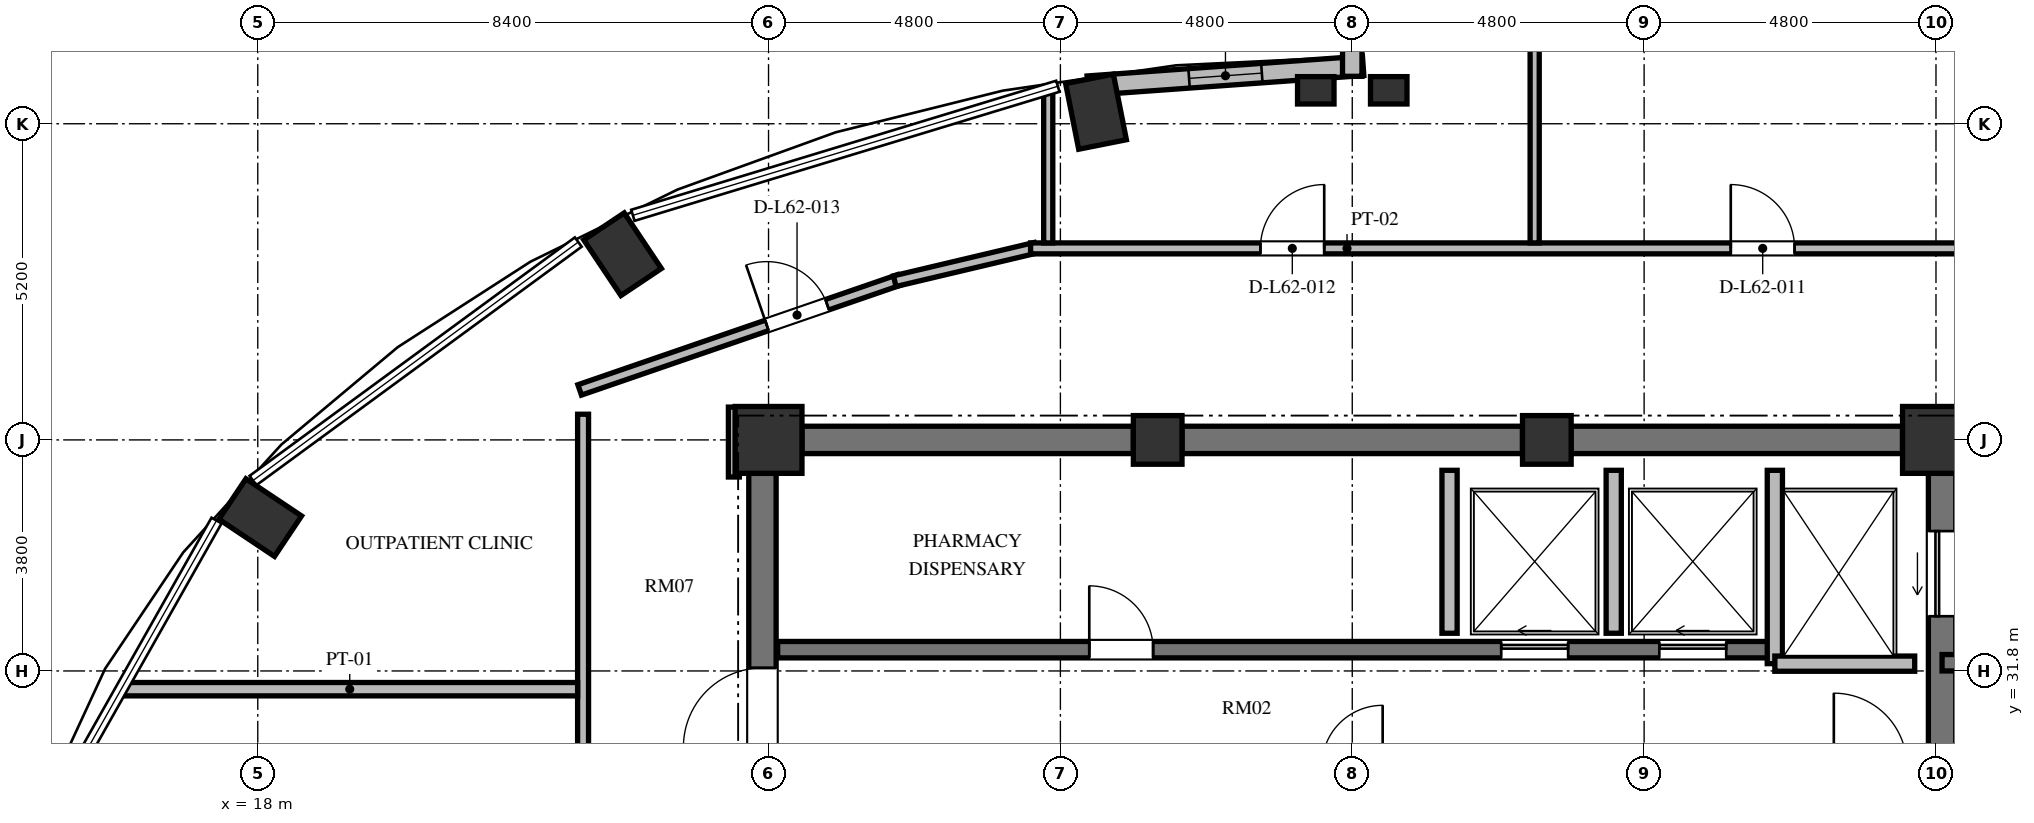
"""IFC4 building model, lengths in metres.
Left out: names, types, materials, properties, quantities, classifications, styles, units other than length and angle.
Written with IfcOpenShell. Run it as: python <this file> out.ifc"""

import sys

from ifc_helpers import new_model, si_unit, direction, frame, frame_2d, origin, origin_2d, place, context, subcontext, project, spatial, rectangle, extrude, element, fill, save


model = new_model("IFC4")
c1 = context("Model", 3, precision=1e-05, world=origin(), true_north=direction((0.0, 1.0)))
c2 = subcontext(c1, "Body", "Model", "MODEL_VIEW")
j1 = project(units=[si_unit("LENGTHUNIT", "METRE"), si_unit("PLANEANGLEUNIT", "RADIAN")], contexts=[c1])
p1 = place(None, origin())
s1 = spatial("IfcSite", under=j1, at=p1, CompositionType="ELEMENT")
p2 = place(p1, origin())
s2 = spatial("IfcBuilding", under=s1, at=p2, CompositionType="ELEMENT")
p3 = place(p2, frame((0.0, 0.0, 238.608)))
s3 = spatial("IfcBuildingStorey", under=s2, at=p3, CompositionType="ELEMENT", Elevation=238.608)
for number, where, z_axis, x_axis in (
    (1, (31.786, 40.998, 0.0), (0.0, 0.0, 1.0), (-0.195, 0.981, 0.0)),
    (2, (24.0, 38.654, 0.0), (0.0, 0.0, 1.0), (-0.556, 0.831, 0.0)),
    (3, (18.04, 34.323, 0.0), (0.0, 0.0, 1.0), (-0.831, 0.556, 0.0)),
):
    element("IfcColumn", number, at=place(p3, frame(where, z_axis=z_axis, x_axis=x_axis)), inside=s3, PredefinedType="COLUMN", context=c2, shape_type="SweptSolid", body=[
        extrude(rectangle(XDim=1.1, YDim=0.8, at=origin_2d()), origin(), (0.0, 0.0, 1.0), 3.648),
    ])
p4 = place(p3, frame((45.6, 35.6, 0.0), z_axis=(0.0, 0.0, 1.0), x_axis=(1.0, 0.0, 0.0)))
e4 = element("IfcColumn", 4, at=p4, inside=s3, PredefinedType="COLUMN", context=c2, shape_type="SweptSolid", body=[
    extrude(rectangle(XDim=1.1, YDim=1.1, at=origin_2d()), origin(), (0.0, 0.0, 1.0), 3.648),
])
for number, where, z_axis, x_axis in (
    (5, (39.2, 35.6, 0.0), (0.0, 0.0, 1.0), (1.0, 0.0, 0.0)),
    (6, (32.8, 35.6, 0.0), (0.0, 0.0, 1.0), (1.0, 0.0, 0.0)),
):
    element("IfcColumn", number, at=place(p3, frame(where, z_axis=z_axis, x_axis=x_axis)), inside=s3, PredefinedType="COLUMN", context=c2, shape_type="SweptSolid", body=[
        extrude(rectangle(XDim=0.8, YDim=0.8, at=origin_2d()), origin(), (0.0, 0.0, 1.0), 3.648),
    ])
p5 = place(p3, frame((26.4, 35.6, 0.0), z_axis=(0.0, 0.0, 1.0), x_axis=(1.0, 0.0, 0.0)))
e7 = element("IfcColumn", 7, at=p5, inside=s3, PredefinedType="COLUMN", context=c2, shape_type="SweptSolid", body=[
    extrude(rectangle(XDim=1.1, YDim=1.1, at=origin_2d()), origin(), (0.0, 0.0, 1.0), 3.648),
])
for number, where, z_axis, x_axis in (
    (8, (35.4, 41.35, 0.0), (0.0, 0.0, 1.0), (1.0, 0.0, 0.0)),
    (9, (36.6, 41.35, 0.0), (0.0, 0.0, 1.0), (1.0, 0.0, 0.0)),
):
    element("IfcColumn", number, at=place(p3, frame(where, z_axis=z_axis, x_axis=x_axis)), inside=s3, PredefinedType="PILASTER", context=c2, shape_type="SweptSolid", body=[
        extrude(rectangle(XDim=0.6, YDim=0.45, at=origin_2d()), origin(), (0.0, 0.0, 1.0), 3.648),
    ])
p6 = place(p3, frame((26.3, 20.95, 0.0), z_axis=(0.0, 0.0, 1.0), x_axis=(0.0, 1.0, 0.0)))
e10 = element("IfcWall", 10, at=p6, inside=s3, PredefinedType="SHEAR", context=c2, shape_type="SweptSolid", body=[
    extrude(rectangle(XDim=14.1, YDim=0.45, at=frame_2d((7.05, 0.0))), origin(), (0.0, 0.0, 1.0), 3.648),
])
p7 = place(p6, frame((6.5, 0.0, 0.0)))
e11 = element("IfcOpeningElement", 11, at=p7, cuts=e10, PredefinedType="OPENING", context=c2, shape_type="SweptSolid", body=[
    extrude(rectangle(XDim=1.2, YDim=2.15, at=frame_2d((0.6, 1.075))), frame((0.0, 0.235, 0.0), z_axis=(0.0, -1.0, 0.0), x_axis=(1.0, 0.0, 0.0)), (0.0, 0.0, 1.0), 0.47),
])
p8 = place(p6, frame((9.6, 0.0, 0.0)))
e12 = element("IfcOpeningElement", 12, at=p8, cuts=e10, PredefinedType="OPENING", context=c2, shape_type="SweptSolid", body=[
    extrude(rectangle(XDim=1.3, YDim=2.2, at=frame_2d((0.65, 1.1))), frame((0.0, 0.235, 0.0), z_axis=(0.0, -1.0, 0.0), x_axis=(1.0, 0.0, 0.0)), (0.0, 0.0, 1.0), 0.47),
])
p9 = place(p6, frame((3.26, 0.0, 0.0)))
e13 = element("IfcOpeningElement", 13, at=p9, cuts=e10, PredefinedType="OPENING", context=c2, shape_type="SweptSolid", body=[
    extrude(rectangle(XDim=1.3, YDim=2.2, at=frame_2d((0.65, 1.1))), frame((0.0, 0.235, 0.0), z_axis=(0.0, -1.0, 0.0), x_axis=(1.0, 0.0, 0.0)), (0.0, 0.0, 1.0), 0.47),
])
p10 = place(p3, frame((45.7, 20.95, 0.0), z_axis=(0.0, 0.0, 1.0), x_axis=(0.0, 1.0, 0.0)))
e14 = element("IfcWall", 14, at=p10, inside=s3, PredefinedType="SHEAR", context=c2, shape_type="SweptSolid", body=[
    extrude(rectangle(XDim=14.1, YDim=0.45, at=frame_2d((7.05, 0.0))), origin(), (0.0, 0.0, 1.0), 3.648),
])
p11 = place(p10, frame((11.75, 0.0, 0.0)))
e15 = element("IfcOpeningElement", 15, at=p11, cuts=e14, PredefinedType="OPENING", context=c2, shape_type="SweptSolid", body=[
    extrude(rectangle(XDim=1.4, YDim=2.3, at=frame_2d((0.7, 1.15))), frame((0.0, 0.235, 0.0), z_axis=(0.0, -1.0, 0.0), x_axis=(1.0, 0.0, 0.0)), (0.0, 0.0, 1.0), 0.47),
])
p12 = place(p10, frame((0.95, 0.0, 0.0)))
e16 = element("IfcOpeningElement", 16, at=p12, cuts=e14, PredefinedType="OPENING", context=c2, shape_type="SweptSolid", body=[
    extrude(rectangle(XDim=1.4, YDim=2.3, at=frame_2d((0.7, 1.15))), frame((0.0, 0.235, 0.0), z_axis=(0.0, -1.0, 0.0), x_axis=(1.0, 0.0, 0.0)), (0.0, 0.0, 1.0), 0.47),
])
p13 = place(p3, frame((26.95, 35.6, 0.0), z_axis=(0.0, 0.0, 1.0), x_axis=(1.0, 0.0, 0.0)))
e17 = element("IfcWall", 17, at=p13, inside=s3, PredefinedType="SHEAR", context=c2, shape_type="SweptSolid", body=[
    extrude(rectangle(XDim=5.45, YDim=0.45, at=frame_2d((2.725, 0.0))), origin(), (0.0, 0.0, 1.0), 3.648),
])
p14 = place(p3, frame((33.2, 35.6, 0.0), z_axis=(0.0, 0.0, 1.0), x_axis=(1.0, 0.0, 0.0)))
e18 = element("IfcWall", 18, at=p14, inside=s3, PredefinedType="SHEAR", context=c2, shape_type="SweptSolid", body=[
    extrude(rectangle(XDim=5.6, YDim=0.45, at=frame_2d((2.8, 0.0))), origin(), (0.0, 0.0, 1.0), 3.648),
])
p15 = place(p3, frame((39.6, 35.6, 0.0), z_axis=(0.0, 0.0, 1.0), x_axis=(1.0, 0.0, 0.0)))
e19 = element("IfcWall", 19, at=p15, inside=s3, PredefinedType="SHEAR", context=c2, shape_type="SweptSolid", body=[
    extrude(rectangle(XDim=5.45, YDim=0.45, at=frame_2d((2.725, 0.0))), origin(), (0.0, 0.0, 1.0), 3.648),
])
p16 = place(p3, frame((36.179, 41.753, 0.0), z_axis=(0.0, 0.0, 1.0), x_axis=(-0.997408782787, -0.071942477163, 0.0)))
e20 = element("IfcWall", 20, at=p16, inside=s3, PredefinedType="SOLIDWALL", context=c2, shape_type="SweptSolid", body=[
    extrude(rectangle(XDim=4.541, YDim=0.32, at=frame_2d((2.27, 0.0))), origin(), (0.0, 0.0, 1.0), 3.448),
])
p17 = place(p16, frame((1.67, 0.0, 0.85)))
e21 = element("IfcOpeningElement", 21, at=p17, cuts=e20, PredefinedType="OPENING", context=c2, shape_type="SweptSolid", body=[
    extrude(rectangle(XDim=1.2, YDim=1.8, at=frame_2d((0.6, 0.9))), frame((0.0, 0.17, 0.0), z_axis=(0.0, -1.0, 0.0), x_axis=(1.0, 0.0, 0.0)), (0.0, 0.0, 1.0), 0.34),
])
p18 = place(p3, frame((36.0, 46.7, 0.0), z_axis=(0.0, 0.0, 1.0), x_axis=(0.0, -1.0, 0.0)))
e22 = element("IfcWall", 22, at=p18, inside=s3, PredefinedType="SOLIDWALL", context=c2, shape_type="SweptSolid", body=[
    extrude(rectangle(XDim=5.12, YDim=0.32, at=frame_2d((2.56, 0.0))), origin(), (0.0, 0.0, 1.0), 3.448),
])
p19 = place(p18, frame((1.36, 0.0, 0.84)))
e23 = element("IfcOpeningElement", 23, at=p19, cuts=e22, PredefinedType="OPENING", context=c2, shape_type="SweptSolid", body=[
    extrude(rectangle(XDim=2.4, YDim=2.04, at=frame_2d((1.2, 1.02))), frame((0.0, 0.17, 0.0), z_axis=(0.0, -1.0, 0.0), x_axis=(1.0, 0.0, 0.0)), (0.0, 0.0, 1.0), 0.34),
])
p20 = place(p3, frame((26.55, 32.15, 0.0), z_axis=(0.0, 0.0, 1.0), x_axis=(1.0, 0.0, 0.0)))
e24 = element("IfcWall", 24, at=p20, inside=s3, PredefinedType="SHEAR", context=c2, shape_type="SweptSolid", body=[
    extrude(rectangle(XDim=16.4, YDim=0.27, at=frame_2d((8.2, 0.0))), origin(), (0.0, 0.0, 1.0), 3.648),
])
p21 = place(p20, frame((5.125, 0.0, 0.0)))
e25 = element("IfcOpeningElement", 25, at=p21, cuts=e24, PredefinedType="OPENING", context=c2, shape_type="SweptSolid", body=[
    extrude(rectangle(XDim=1.05, YDim=2.15, at=frame_2d((0.525, 1.075))), frame((0.0, 0.145, 0.0), z_axis=(0.0, -1.0, 0.0), x_axis=(1.0, 0.0, 0.0)), (0.0, 0.0, 1.0), 0.29),
])
p22 = place(p20, frame((11.9, 0.0, 0.0)))
e26 = element("IfcOpeningElement", 26, at=p22, cuts=e24, PredefinedType="OPENING", context=c2, shape_type="SweptSolid", body=[
    extrude(rectangle(XDim=1.1, YDim=2.2, at=frame_2d((0.55, 1.1))), frame((0.0, 0.145, 0.0), z_axis=(0.0, -1.0, 0.0), x_axis=(1.0, 0.0, 0.0)), (0.0, 0.0, 1.0), 0.29),
])
p23 = place(p20, frame((14.5, 0.0, 0.0)))
e27 = element("IfcOpeningElement", 27, at=p23, cuts=e24, PredefinedType="OPENING", context=c2, shape_type="SweptSolid", body=[
    extrude(rectangle(XDim=1.1, YDim=2.2, at=frame_2d((0.55, 1.1))), frame((0.0, 0.145, 0.0), z_axis=(0.0, -1.0, 0.0), x_axis=(1.0, 0.0, 0.0)), (0.0, 0.0, 1.0), 0.29),
])
p24 = place(p3, frame((42.95, 31.92, 0.0), z_axis=(0.0, 0.0, 1.0), x_axis=(0.0, 1.0, 0.0)))
e28 = element("IfcWall", 28, at=p24, inside=s3, PredefinedType="SOLIDWALL", context=c2, shape_type="SweptSolid", body=[
    extrude(rectangle(XDim=3.18, YDim=0.25, at=frame_2d((1.59, 0.0))), origin(), (0.0, 0.0, 1.0), 3.448),
])
p25 = place(p3, frame((42.95, 31.92, 0.0), z_axis=(0.0, 0.0, 1.0), x_axis=(1.0, 0.0, 0.0)))
e29 = element("IfcWall", 29, at=p25, inside=s3, PredefinedType="SOLIDWALL", context=c2, shape_type="SweptSolid", body=[
    extrude(rectangle(XDim=2.3, YDim=0.25, at=frame_2d((1.15, 0.0))), origin(), (0.0, 0.0, 1.0), 3.448),
])
for number, where, z_axis, x_axis in (
    (30, (37.6, 32.42, 0.0), (0.0, 0.0, 1.0), (0.0, 1.0, 0.0)),
    (31, (40.3, 32.42, 0.0), (0.0, 0.0, 1.0), (0.0, 1.0, 0.0)),
):
    element("IfcWall", number, at=place(p3, frame(where, z_axis=z_axis, x_axis=x_axis)), inside=s3, PredefinedType="SOLIDWALL", context=c2, shape_type="SweptSolid", body=[
        extrude(rectangle(XDim=2.68, YDim=0.25, at=frame_2d((1.34, 0.0))), origin(), (0.0, 0.0, 1.0), 3.448),
    ])
p26 = place(p3, frame((45.7, 31.935, 0.0), z_axis=(0.0, 0.0, 1.0), x_axis=(1.0, 0.0, 0.0)))
e32 = element("IfcWall", 32, at=p26, inside=s3, PredefinedType="SHEAR", context=c2, shape_type="SweptSolid", body=[
    extrude(rectangle(XDim=4.715, YDim=0.27, at=frame_2d((2.357, 0.0))), origin(), (0.0, 0.0, 1.0), 3.648),
])
p27 = place(p3, frame((23.294, 36.422, 0.0), z_axis=(0.0, 0.0, 1.0), x_axis=(0.945493277461, 0.325641616316, 0.0)))
e33 = element("IfcWall", 33, at=p27, inside=s3, PredefinedType="PARTITIONING", context=c2, shape_type="SweptSolid", body=[
    extrude(rectangle(XDim=5.562, YDim=0.18, at=frame_2d((2.781, 0.0))), origin(), (0.0, 0.0, 1.0), 3.073),
])
p28 = place(p27, frame((3.256, 0.0, 0.0)))
e34 = element("IfcOpeningElement", 34, at=p28, cuts=e33, PredefinedType="OPENING", context=c2, shape_type="SweptSolid", body=[
    extrude(rectangle(XDim=1.05, YDim=2.15, at=frame_2d((0.525, 1.075))), frame((0.0, 0.1, 0.0), z_axis=(0.0, -1.0, 0.0), x_axis=(1.0, 0.0, 0.0)), (0.0, 0.0, 1.0), 0.2),
])
p29 = place(p3, frame((28.476, 38.211, 0.0), z_axis=(0.0, 0.0, 1.0), x_axis=(0.973030562203, 0.230676234189, 0.0)))
e35 = element("IfcWall", 35, at=p29, inside=s3, PredefinedType="PARTITIONING", context=c2, shape_type="SweptSolid", body=[
    extrude(rectangle(XDim=2.377, YDim=0.18, at=frame_2d((1.188, 0.0))), origin(), (0.0, 0.0, 1.0), 3.448),
])
p30 = place(p3, frame((30.71, 38.75, 0.0), z_axis=(0.0, 0.0, 1.0), x_axis=(1.0, 0.0, 0.0)))
e36 = element("IfcWall", 36, at=p30, inside=s3, PredefinedType="PARTITIONING", context=c2, shape_type="SweptSolid", body=[
    extrude(rectangle(XDim=20.815, YDim=0.18, at=frame_2d((10.408, 0.0))), origin(), (0.0, 0.0, 1.0), 3.073),
])
p31 = place(p30, frame((11.515, 0.0, 0.0)))
e37 = element("IfcOpeningElement", 37, at=p31, cuts=e36, PredefinedType="OPENING", context=c2, shape_type="SweptSolid", body=[
    extrude(rectangle(XDim=1.05, YDim=2.15, at=frame_2d((0.525, 1.075))), frame((0.0, 0.1, 0.0), z_axis=(0.0, -1.0, 0.0), x_axis=(1.0, 0.0, 0.0)), (0.0, 0.0, 1.0), 0.2),
])
p32 = place(p30, frame((3.779, 0.0, 0.0)))
e38 = element("IfcOpeningElement", 38, at=p32, cuts=e36, PredefinedType="OPENING", context=c2, shape_type="SweptSolid", body=[
    extrude(rectangle(XDim=1.05, YDim=2.15, at=frame_2d((0.525, 1.075))), frame((0.0, 0.1, 0.0), z_axis=(0.0, -1.0, 0.0), x_axis=(1.0, 0.0, 0.0)), (0.0, 0.0, 1.0), 0.2),
])
p33 = place(p3, frame((25.83, 36.14, 0.0), z_axis=(0.0, 0.0, 1.0), x_axis=(0.0, -1.0, 0.0)))
e39 = element("IfcWall", 39, at=p33, inside=s3, PredefinedType="PARTITIONING", context=c2, shape_type="SweptSolid", body=[
    extrude(rectangle(XDim=1.15, YDim=0.18, at=frame_2d((0.575, 0.0))), origin(), (0.0, 0.0, 1.0), 3.448),
])
p34 = place(p3, frame((23.35, 19.98, 0.0), z_axis=(0.0, 0.0, 1.0), x_axis=(0.0, 1.0, 0.0)))
e40 = element("IfcWall", 40, at=p34, inside=s3, PredefinedType="PARTITIONING", context=c2, shape_type="SweptSolid", body=[
    extrude(rectangle(XDim=16.042, YDim=0.18, at=frame_2d((8.021, 0.0))), origin(), (0.0, 0.0, 1.0), 3.448),
])
p35 = place(p34, frame((7.478, 0.0, 0.0)))
e41 = element("IfcOpeningElement", 41, at=p35, cuts=e40, PredefinedType="OPENING", context=c2, shape_type="SweptSolid", body=[
    extrude(rectangle(XDim=1.05, YDim=2.15, at=frame_2d((0.525, 1.075))), frame((0.0, 0.1, 0.0), z_axis=(0.0, -1.0, 0.0), x_axis=(1.0, 0.0, 0.0)), (0.0, 0.0, 1.0), 0.2),
])
p36 = place(p34, frame((1.719, 0.0, 0.0)))
e42 = element("IfcOpeningElement", 42, at=p36, cuts=e40, PredefinedType="OPENING", context=c2, shape_type="SweptSolid", body=[
    extrude(rectangle(XDim=1.4, YDim=2.2, at=frame_2d((0.7, 1.1))), frame((0.0, 0.1, 0.0), z_axis=(0.0, -1.0, 0.0), x_axis=(1.0, 0.0, 0.0)), (0.0, 0.0, 1.0), 0.2),
])
p37 = place(p3, frame((15.765, 31.5, 0.0), z_axis=(0.0, 0.0, 1.0), x_axis=(1.0, 0.0, 0.0)))
e43 = element("IfcWall", 43, at=p37, inside=s3, PredefinedType="PARTITIONING", context=c2, shape_type="SweptSolid", body=[
    extrude(rectangle(XDim=7.495, YDim=0.22, at=frame_2d((3.748, 0.0))), origin(), (0.0, 0.0, 1.0), 3.448),
])
p38 = place(p3, frame((31.0, 38.84, 0.0), z_axis=(0.0, 0.0, 1.0), x_axis=(0.0, 1.0, 0.0)))
e44 = element("IfcWall", 44, at=p38, inside=s3, PredefinedType="PARTITIONING", context=c2, shape_type="SweptSolid", body=[
    extrude(rectangle(XDim=2.511, YDim=0.15, at=frame_2d((1.256, 0.0))), origin(), (0.0, 0.0, 1.0), 3.448),
])
p39 = place(p3, frame((39.0, 38.84, 0.0), z_axis=(0.0, 0.0, 1.0), x_axis=(0.0, 1.0, 0.0)))
e45 = element("IfcWall", 45, at=p39, inside=s3, PredefinedType="PARTITIONING", context=c2, shape_type="SweptSolid", body=[
    extrude(rectangle(XDim=7.482, YDim=0.15, at=frame_2d((3.741, 0.0))), origin(), (0.0, 0.0, 1.0), 3.448),
])
p40 = place(p17, origin())
e46 = element("IfcWindow", 46, at=p40, inside=s3, PartitioningType="SINGLE_PANEL", PredefinedType="WINDOW", context=c2, shape_type="SweptSolid", body=[
    extrude(rectangle(XDim=1.2, YDim=1.8, at=frame_2d((0.6, 0.9))), frame((0.0, 0.03, 0.0), z_axis=(0.0, -1.0, 0.0), x_axis=(1.0, 0.0, 0.0)), (0.0, 0.0, 1.0), 0.06),
])
fill(e21, e46)
p41 = place(p8, origin())
e47 = element("IfcDoor", 47, at=p41, inside=s3, OperationType="SINGLE_SWING_LEFT", PredefinedType="DOOR", context=c2, shape_type="SweptSolid", body=[
    extrude(rectangle(XDim=1.3, YDim=2.2, at=frame_2d((0.65, 1.1))), frame((0.0, 0.025, 0.0), z_axis=(0.0, -1.0, 0.0), x_axis=(1.0, 0.0, 0.0)), (0.0, 0.0, 1.0), 0.05),
])
fill(e12, e47)
p42 = place(p21, origin())
e48 = element("IfcDoor", 48, at=p42, inside=s3, OperationType="SINGLE_SWING_LEFT", PredefinedType="DOOR", context=c2, shape_type="SweptSolid", body=[
    extrude(rectangle(XDim=1.05, YDim=2.15, at=frame_2d((0.525, 1.075))), frame((0.0, 0.025, 0.0), z_axis=(0.0, -1.0, 0.0), x_axis=(1.0, 0.0, 0.0)), (0.0, 0.0, 1.0), 0.05),
])
fill(e25, e48)
p43 = place(p22, origin())
e49 = element("IfcDoor", 49, at=p43, inside=s3, OperationType="SLIDING_TO_LEFT", PredefinedType="DOOR", context=c2, shape_type="SweptSolid", body=[
    extrude(rectangle(XDim=1.1, YDim=2.2, at=frame_2d((0.55, 1.1))), frame((0.0, 0.025, 0.0), z_axis=(0.0, -1.0, 0.0), x_axis=(1.0, 0.0, 0.0)), (0.0, 0.0, 1.0), 0.05),
])
fill(e26, e49)
p44 = place(p23, origin())
e50 = element("IfcDoor", 50, at=p44, inside=s3, OperationType="SLIDING_TO_LEFT", PredefinedType="DOOR", context=c2, shape_type="SweptSolid", body=[
    extrude(rectangle(XDim=1.1, YDim=2.2, at=frame_2d((0.55, 1.1))), frame((0.0, 0.025, 0.0), z_axis=(0.0, -1.0, 0.0), x_axis=(1.0, 0.0, 0.0)), (0.0, 0.0, 1.0), 0.05),
])
fill(e27, e50)
p45 = place(p11, origin())
e51 = element("IfcDoor", 51, at=p45, inside=s3, OperationType="SLIDING_TO_LEFT", PredefinedType="DOOR", context=c2, shape_type="SweptSolid", body=[
    extrude(rectangle(XDim=1.4, YDim=2.3, at=frame_2d((0.7, 1.15))), frame((0.0, 0.025, 0.0), z_axis=(0.0, -1.0, 0.0), x_axis=(1.0, 0.0, 0.0)), (0.0, 0.0, 1.0), 0.05),
])
fill(e15, e51)
p46 = place(p31, origin())
e52 = element("IfcDoor", 52, at=p46, inside=s3, OperationType="SINGLE_SWING_LEFT", PredefinedType="DOOR", context=c2, shape_type="SweptSolid", body=[
    extrude(rectangle(XDim=1.05, YDim=2.15, at=frame_2d((0.525, 1.075))), frame((0.0, 0.025, 0.0), z_axis=(0.0, -1.0, 0.0), x_axis=(1.0, 0.0, 0.0)), (0.0, 0.0, 1.0), 0.05),
])
fill(e37, e52)
p47 = place(p32, origin())
e53 = element("IfcDoor", 53, at=p47, inside=s3, OperationType="SINGLE_SWING_RIGHT", PredefinedType="DOOR", context=c2, shape_type="SweptSolid", body=[
    extrude(rectangle(XDim=1.05, YDim=2.15, at=frame_2d((0.525, 1.075))), frame((0.0, 0.025, 0.0), z_axis=(0.0, -1.0, 0.0), x_axis=(1.0, 0.0, 0.0)), (0.0, 0.0, 1.0), 0.05),
])
fill(e38, e53)
p48 = place(p28, origin())
e54 = element("IfcDoor", 54, at=p48, inside=s3, OperationType="SINGLE_SWING_LEFT", PredefinedType="DOOR", context=c2, shape_type="SweptSolid", body=[
    extrude(rectangle(XDim=1.05, YDim=2.15, at=frame_2d((0.525, 1.075))), frame((0.0, 0.025, 0.0), z_axis=(0.0, -1.0, 0.0), x_axis=(1.0, 0.0, 0.0)), (0.0, 0.0, 1.0), 0.05),
])
fill(e34, e54)
save(model, sys.argv[1])
